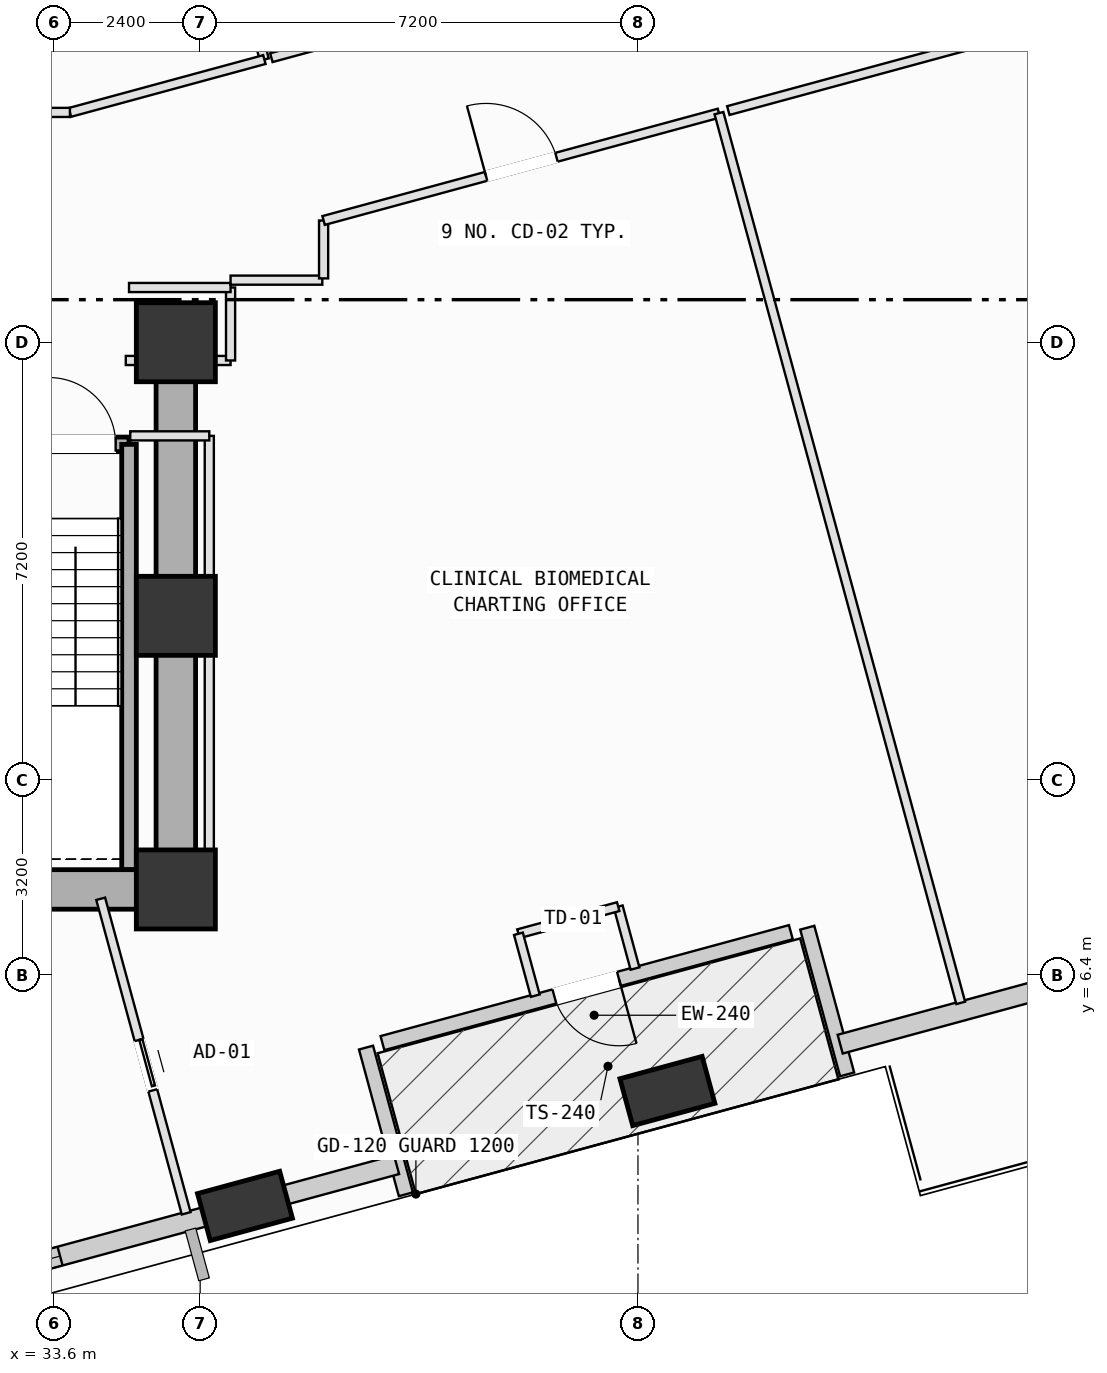
"""IFC4 building model, lengths in metres.
Left out: names, types, materials, properties, quantities, classifications, styles, units other than length and angle.
Written with IfcOpenShell. Run it as: python <this file> out.ifc"""

import sys

from ifc_helpers import new_model, si_unit, direction, frame, frame_2d, origin, origin_2d, place, context, subcontext, project, spatial, rectangle, extrude, element, fill, save


model = new_model("IFC4")
c1 = context("Model", 3, precision=1e-05, world=origin(), true_north=direction((0.0, 1.0)))
c2 = subcontext(c1, "Body", "Model", "MODEL_VIEW")
j1 = project(units=[si_unit("LENGTHUNIT", "METRE"), si_unit("PLANEANGLEUNIT", "RADIAN")], contexts=[c1])
p1 = place(None, origin())
s1 = spatial("IfcSite", under=j1, at=p1, CompositionType="ELEMENT")
p2 = place(p1, origin())
s2 = spatial("IfcBuilding", under=s1, at=p2, CompositionType="ELEMENT")
p3 = place(p2, frame((0.0, 0.0, 88.4)))
s3 = spatial("IfcBuildingStorey", under=s2, at=p3, CompositionType="ELEMENT", Elevation=88.4)
for number, where, z_axis, x_axis in (
    (1, (35.6, 7.8, 0.0), (0.0, 0.0, 1.0), (1.0, 0.0, 0.0)),
    (2, (35.6, 12.3, 0.0), (0.0, 0.0, 1.0), (1.0, 0.0, 0.0)),
    (3, (35.6, 16.8, 0.0), (0.0, 0.0, 1.0), (1.0, 0.0, 0.0)),
):
    element("IfcColumn", number, at=place(p3, frame(where, z_axis=z_axis, x_axis=x_axis)), inside=s3, PredefinedType="COLUMN", context=c2, shape_type="SweptSolid", body=[
        extrude(rectangle(XDim=1.3, YDim=1.3, at=origin_2d()), origin(), (0.0, 0.0, 1.0), 4.0),
    ])
p4 = place(p3, frame((36.737, 2.595, 0.055), z_axis=(0.091494482232, 0.013687179957, 0.995711514861), x_axis=(-0.400965338617, 0.91577205319, 0.024255799796)))
e4 = element("IfcColumn", 4, at=p4, inside=s3, PredefinedType="COLUMN", context=c2, shape_type="SweptSolid", body=[
    extrude(rectangle(XDim=1.4, YDim=0.8, at=origin_2d()), origin(), (0.0, 0.0, 1.0), 3.96),
])
p5 = place(p3, frame((43.685, 4.484, 0.056), z_axis=(0.083481406489, 0.04229560181, 0.995611338243), x_axis=(-0.668997536394, 0.742859501733, 0.024536849522)))
e5 = element("IfcColumn", 5, at=p5, inside=s3, PredefinedType="COLUMN", context=c2, shape_type="SweptSolid", body=[
    extrude(rectangle(XDim=1.4, YDim=0.8, at=origin_2d()), origin(), (0.0, 0.0, 1.0), 3.96),
])
p6 = place(p3, frame((45.714, 7.097, 0.0), z_axis=(0.0, 0.0, 1.0), x_axis=(-0.96502158219, -0.262170452011, 0.0)))
e6 = element("IfcWall", 6, at=p6, inside=s3, PredefinedType="SOLIDWALL", context=c2, shape_type="SweptSolid", body=[
    extrude(rectangle(XDim=6.96, YDim=0.24, at=frame_2d((3.48, 0.0))), origin(), (0.0, 0.0, 1.0), 2.745),
])
p7 = place(p6, frame((2.93, 0.0, 0.0)))
e7 = element("IfcOpeningElement", 7, at=p7, cuts=e6, PredefinedType="OPENING", context=c2, shape_type="SweptSolid", body=[
    extrude(rectangle(XDim=1.1, YDim=2.15, at=frame_2d((0.55, 1.075))), frame((0.0, 0.13, 0.0), z_axis=(0.0, -1.0, 0.0), x_axis=(1.0, 0.0, 0.0)), (0.0, 0.0, 1.0), 0.26),
])
for number, where, z_axis, x_axis in (
    (8, (38.728, 5.199, 0.0), (0.0, 0.0, 1.0), (0.262, -0.965, 0.0)),
    (9, (46.64, 4.758, 0.0), (0.0, 0.0, 1.0), (-0.262, 0.965, 0.0)),
):
    element("IfcWall", number, at=place(p3, frame(where, z_axis=z_axis, x_axis=x_axis)), inside=s3, PredefinedType="SOLIDWALL", context=c2, shape_type="SweptSolid", body=[
        extrude(rectangle(XDim=2.5, YDim=0.24, at=frame_2d((1.25, 0.0))), origin(), (0.0, 0.0, 1.0), 3.165),
    ])
p8 = place(p3, frame((36.431, 2.513, 0.0), z_axis=(0.0, 0.0, 1.0), x_axis=(-0.96501271104, -0.26220310359, 0.0)))
e10 = element("IfcWall", 10, at=p8, inside=s3, PredefinedType="SOLIDWALL", context=c2, shape_type="SweptSolid", body=[
    extrude(rectangle(XDim=6.214, YDim=0.32, at=frame_2d((3.107, 0.0))), origin(), (0.0, 0.0, 1.0), 3.165),
])
p9 = place(p8, frame((2.835, 0.0, 0.75)))
e11 = element("IfcOpeningElement", 11, at=p9, cuts=e10, PredefinedType="OPENING", context=c2, shape_type="SweptSolid", body=[
    extrude(rectangle(XDim=1.4, YDim=1.85, at=frame_2d((0.7, 0.925))), frame((0.0, 0.17, 0.0), z_axis=(0.0, -1.0, 0.0), x_axis=(1.0, 0.0, 0.0)), (0.0, 0.0, 1.0), 0.34),
])
p10 = place(p3, frame((39.23, 3.273, 0.0), z_axis=(0.0, 0.0, 1.0), x_axis=(-0.965005471211, -0.262229747612, 0.0)))
e12 = element("IfcWall", 12, at=p10, inside=s3, PredefinedType="SOLIDWALL", context=c2, shape_type="SweptSolid", body=[
    extrude(rectangle(XDim=1.909, YDim=0.32, at=frame_2d((0.954, 0.0))), origin(), (0.0, 0.0, 1.0), 3.145),
])
p11 = place(p3, frame((50.336, 6.29, 0.0), z_axis=(0.0, 0.0, 1.0), x_axis=(-0.965017376206, -0.262185933302, 0.0)))
e13 = element("IfcWall", 13, at=p11, inside=s3, PredefinedType="SOLIDWALL", context=c2, shape_type="SweptSolid", body=[
    extrude(rectangle(XDim=3.948, YDim=0.32, at=frame_2d((1.974, 0.0))), origin(), (0.0, 0.0, 1.0), 2.745),
])
p12 = place(p3, frame((31.37, 15.12, 0.0), z_axis=(0.0, 0.0, 1.0), x_axis=(1.0, 0.0, 0.0)))
e14 = element("IfcWall", 14, at=p12, inside=s3, PredefinedType="SOLIDWALL", context=c2, shape_type="SweptSolid", body=[
    extrude(rectangle(XDim=3.46, YDim=0.24, at=frame_2d((1.73, 0.0))), origin(), (0.0, 0.0, 1.0), 3.78),
])
p13 = place(p12, frame((2.14, 0.0, 0.0)))
e15 = element("IfcOpeningElement", 15, at=p13, cuts=e14, PredefinedType="OPENING", context=c2, shape_type="SweptSolid", body=[
    extrude(rectangle(XDim=1.1, YDim=2.15, at=frame_2d((0.55, 1.075))), frame((0.0, 0.13, 0.0), z_axis=(0.0, -1.0, 0.0), x_axis=(1.0, 0.0, 0.0)), (0.0, 0.0, 1.0), 0.26),
])
p14 = place(p3, frame((34.83, 15.12, 0.0), z_axis=(0.0, 0.0, 1.0), x_axis=(0.0, -1.0, 0.0)))
e16 = element("IfcWall", 16, at=p14, inside=s3, PredefinedType="SOLIDWALL", context=c2, shape_type="SweptSolid", body=[
    extrude(rectangle(XDim=6.995, YDim=0.24, at=frame_2d((3.498, 0.0))), origin(), (0.0, 0.0, 1.0), 3.78),
])
p15 = place(p3, frame((24.8, 7.8, 0.0), z_axis=(0.0, 0.0, 1.0), x_axis=(1.0, 0.0, 0.0)))
e17 = element("IfcWall", 17, at=p15, inside=s3, PredefinedType="SHEAR", context=c2, shape_type="SweptSolid", body=[
    extrude(rectangle(XDim=10.8, YDim=0.65, at=frame_2d((5.4, 0.0))), origin(), (0.0, 0.0, 1.0), 3.78),
])
p16 = place(p3, frame((35.6, 7.8, 0.0), z_axis=(0.0, 0.0, 1.0), x_axis=(0.0, 1.0, 0.0)))
e18 = element("IfcWall", 18, at=p16, inside=s3, PredefinedType="SHEAR", context=c2, shape_type="SweptSolid", body=[
    extrude(rectangle(XDim=9.0, YDim=0.65, at=frame_2d((4.5, 0.0))), origin(), (0.0, 0.0, 1.0), 3.78),
])
p17 = place(p3, frame((34.364, 7.646, 0.0), z_axis=(0.0, 0.0, 1.0), x_axis=(0.262277228578, -0.96499256752, 0.0)))
e19 = element("IfcWall", 19, at=p17, inside=s3, PredefinedType="PARTITIONING", context=c2, shape_type="SweptSolid", body=[
    extrude(rectangle(XDim=5.361, YDim=0.15, at=frame_2d((2.68, 0.0))), origin(), (0.0, 0.0, 1.0), 3.78),
])
p18 = place(p17, frame((2.406, 0.0, 0.0)))
e20 = element("IfcOpeningElement", 20, at=p18, cuts=e19, PredefinedType="OPENING", context=c2, shape_type="SweptSolid", body=[
    extrude(rectangle(XDim=0.86, YDim=2.06, at=frame_2d((0.43, 1.03))), frame((0.0, 0.085, 0.0), z_axis=(0.0, -1.0, 0.0), x_axis=(1.0, 0.0, 0.0)), (0.0, 0.0, 1.0), 0.17),
])
p19 = place(p3, frame((37.449, 2.551, 0.0), z_axis=(0.0, 0.0, 1.0), x_axis=(-0.965019012576, -0.262179910304, 0.0)))
e21 = element("IfcWall", 21, at=p19, inside=s3, PredefinedType="PARTITIONING", context=c2, shape_type="SweptSolid", body=[
    extrude(rectangle(XDim=0.992, YDim=0.15, at=frame_2d((0.496, 0.0))), origin(), (0.0, 0.0, 1.0), 3.145),
])
p20 = place(p3, frame((35.6, 7.5, 0.0), z_axis=(0.0, 0.0, 1.0), x_axis=(1.0, 0.0, 0.0)))
e22 = element("IfcWall", 22, at=p20, inside=s3, PredefinedType="PARTITIONING", context=c2, shape_type="SweptSolid", body=[
    extrude(rectangle(XDim=0.55, YDim=0.15, at=frame_2d((0.275, 0.0))), origin(), (0.0, 0.0, 1.0), 2.745),
])
p21 = place(p3, frame((36.15, 7.5, 0.0), z_axis=(0.0, 0.0, 1.0), x_axis=(0.0, 1.0, 0.0)))
e23 = element("IfcWall", 23, at=p21, inside=s3, PredefinedType="PARTITIONING", context=c2, shape_type="SweptSolid", body=[
    extrude(rectangle(XDim=7.76, YDim=0.15, at=frame_2d((3.88, 0.0))), origin(), (0.0, 0.0, 1.0), 2.765),
])
p22 = place(p3, frame((36.15, 15.26, 0.0), z_axis=(0.0, 0.0, 1.0), x_axis=(-1.0, 0.0, 0.0)))
e24 = element("IfcWall", 24, at=p22, inside=s3, PredefinedType="PARTITIONING", context=c2, shape_type="SweptSolid", body=[
    extrude(rectangle(XDim=1.3, YDim=0.15, at=frame_2d((0.65, 0.0))), origin(), (0.0, 0.0, 1.0), 3.78),
])
p23 = place(p3, frame((34.777, 16.5, 0.0), z_axis=(0.0, 0.0, 1.0), x_axis=(1.0, 0.0, 0.0)))
e25 = element("IfcWall", 25, at=p23, inside=s3, PredefinedType="PARTITIONING", context=c2, shape_type="SweptSolid", body=[
    extrude(rectangle(XDim=1.723, YDim=0.15, at=frame_2d((0.861, 0.0))), origin(), (0.0, 0.0, 1.0), 2.765),
])
p24 = place(p3, frame((36.5, 16.5, 0.0), z_axis=(0.0, 0.0, 1.0), x_axis=(0.0, 1.0, 0.0)))
e26 = element("IfcWall", 26, at=p24, inside=s3, PredefinedType="PARTITIONING", context=c2, shape_type="SweptSolid", body=[
    extrude(rectangle(XDim=1.2, YDim=0.15, at=frame_2d((0.6, 0.0))), origin(), (0.0, 0.0, 1.0), 3.78),
])
p25 = place(p3, frame((36.5, 17.7, 0.0), z_axis=(0.0, 0.0, 1.0), x_axis=(-1.0, 0.0, 0.0)))
e27 = element("IfcWall", 27, at=p25, inside=s3, PredefinedType="PARTITIONING", context=c2, shape_type="SweptSolid", body=[
    extrude(rectangle(XDim=1.67, YDim=0.15, at=frame_2d((0.835, 0.0))), origin(), (0.0, 0.0, 1.0), 3.78),
])
p26 = place(p3, frame((36.5, 17.821, 0.0), z_axis=(0.0, 0.0, 1.0), x_axis=(1.0, 0.0, 0.0)))
e28 = element("IfcWall", 28, at=p26, inside=s3, PredefinedType="PARTITIONING", context=c2, shape_type="SweptSolid", body=[
    extrude(rectangle(XDim=1.509, YDim=0.15, at=frame_2d((0.754, 0.0))), origin(), (0.0, 0.0, 1.0), 3.78),
])
p27 = place(p3, frame((38.03, 17.85, 0.0), z_axis=(0.0, 0.0, 1.0), x_axis=(0.0, 1.0, 0.0)))
e29 = element("IfcWall", 29, at=p27, inside=s3, PredefinedType="PARTITIONING", context=c2, shape_type="SweptSolid", body=[
    extrude(rectangle(XDim=0.952, YDim=0.15, at=frame_2d((0.476, 0.0))), origin(), (0.0, 0.0, 1.0), 3.78),
])
p28 = place(p3, frame((38.03, 18.802, 0.0), z_axis=(0.0, 0.0, 1.0), x_axis=(0.965032576147, 0.26212998107, 0.0)))
e30 = element("IfcWall", 30, at=p28, inside=s3, PredefinedType="PARTITIONING", context=c2, shape_type="SweptSolid", body=[
    extrude(rectangle(XDim=6.738, YDim=0.15, at=frame_2d((3.369, 0.0))), origin(), (0.0, 0.0, 1.0), 2.765),
])
p29 = place(p28, frame((2.769, 0.0, 0.0)))
e31 = element("IfcOpeningElement", 31, at=p29, cuts=e30, PredefinedType="OPENING", context=c2, shape_type="SweptSolid", body=[
    extrude(rectangle(XDim=1.2, YDim=2.15, at=frame_2d((0.6, 1.075))), frame((0.0, 0.085, 0.0), z_axis=(0.0, -1.0, 0.0), x_axis=(1.0, 0.0, 0.0)), (0.0, 0.0, 1.0), 0.17),
])
p30 = place(p3, frame((44.532, 20.568, 0.0), z_axis=(0.0, 0.0, 1.0), x_axis=(0.262195036903, -0.965014902799, 0.0)))
e32 = element("IfcWall", 32, at=p30, inside=s3, PredefinedType="PARTITIONING", context=c2, shape_type="SweptSolid", body=[
    extrude(rectangle(XDim=15.165, YDim=0.15, at=frame_2d((7.582, 0.0))), origin(), (0.0, 0.0, 1.0), 3.78),
])
p31 = place(p3, frame((43.151, 6.499, 0.0), z_axis=(0.0, 0.0, 1.0), x_axis=(-0.261550249958, 0.965189860466, 0.0)))
e33 = element("IfcWall", 33, at=p31, inside=s3, PredefinedType="PARTITIONING", context=c2, shape_type="SweptSolid", body=[
    extrude(rectangle(XDim=1.055, YDim=0.15, at=frame_2d((0.527, 0.0))), origin(), (0.0, 0.0, 1.0), 3.78),
])
p32 = place(p3, frame((42.875, 7.517, 0.0), z_axis=(0.0, 0.0, 1.0), x_axis=(-0.964992044521, -0.262279152833, 0.0)))
e34 = element("IfcWall", 34, at=p32, inside=s3, PredefinedType="PARTITIONING", context=c2, shape_type="SweptSolid", body=[
    extrude(rectangle(XDim=1.701, YDim=0.15, at=frame_2d((0.85, 0.0))), origin(), (0.0, 0.0, 1.0), 2.745),
])
p33 = place(p3, frame((41.234, 7.071, 0.0), z_axis=(0.0, 0.0, 1.0), x_axis=(0.262627892629, -0.964897191422, 0.0)))
e35 = element("IfcWall", 35, at=p33, inside=s3, PredefinedType="PARTITIONING", context=c2, shape_type="SweptSolid", body=[
    extrude(rectangle(XDim=1.055, YDim=0.15, at=frame_2d((0.528, 0.0))), origin(), (0.0, 0.0, 1.0), 3.78),
])
p34 = place(p3, frame((44.686, 20.61, 0.0), z_axis=(0.0, 0.0, 1.0), x_axis=(0.965015946981, 0.262191193736, 0.0)))
e36 = element("IfcWall", 36, at=p34, inside=s3, PredefinedType="PARTITIONING", context=c2, shape_type="SweptSolid", body=[
    extrude(rectangle(XDim=10.64, YDim=0.15, at=frame_2d((5.32, 0.0))), origin(), (0.0, 0.0, 1.0), 3.78),
])
p35 = place(p34, frame((4.72, 0.0, 0.0)))
e37 = element("IfcOpeningElement", 37, at=p35, cuts=e36, PredefinedType="OPENING", context=c2, shape_type="SweptSolid", body=[
    extrude(rectangle(XDim=1.2, YDim=2.15, at=frame_2d((0.6, 1.075))), frame((0.0, 0.085, 0.0), z_axis=(0.0, -1.0, 0.0), x_axis=(1.0, 0.0, 0.0)), (0.0, 0.0, 1.0), 0.17),
])
p36 = place(p3, frame((36.36, 24.011, 0.0), z_axis=(0.0, 0.0, 1.0), x_axis=(0.262090118072, -0.965043403174, 0.0)))
e38 = element("IfcWall", 38, at=p36, inside=s3, PredefinedType="PARTITIONING", context=c2, shape_type="SweptSolid", body=[
    extrude(rectangle(XDim=2.655, YDim=0.15, at=frame_2d((1.327, 0.0))), origin(), (0.0, 0.0, 1.0), 3.78),
])
p37 = place(p3, frame((37.056, 21.449, 0.0), z_axis=(0.0, 0.0, 1.0), x_axis=(-0.965014994537, -0.262194699256, 0.0)))
e39 = element("IfcWall", 39, at=p37, inside=s3, PredefinedType="PARTITIONING", context=c2, shape_type="SweptSolid", body=[
    extrude(rectangle(XDim=3.314, YDim=0.15, at=frame_2d((1.657, 0.0))), origin(), (0.0, 0.0, 1.0), 3.78),
])
p38 = place(p3, frame((33.858, 20.58, 0.0), z_axis=(0.0, 0.0, 1.0), x_axis=(-1.0, 0.0, 0.0)))
e40 = element("IfcWall", 40, at=p38, inside=s3, PredefinedType="PARTITIONING", context=c2, shape_type="SweptSolid", body=[
    extrude(rectangle(XDim=13.039, YDim=0.15, at=frame_2d((6.52, 0.0))), origin(), (0.0, 0.0, 1.0), 3.78),
])
p39 = place(p38, frame((7.273, 0.0, 0.0)))
e41 = element("IfcOpeningElement", 41, at=p39, cuts=e40, PredefinedType="OPENING", context=c2, shape_type="SweptSolid", body=[
    extrude(rectangle(XDim=1.2, YDim=2.15, at=frame_2d((0.6, 1.075))), frame((0.0, 0.085, 0.0), z_axis=(0.0, -1.0, 0.0), x_axis=(1.0, 0.0, 0.0)), (0.0, 0.0, 1.0), 0.17),
])
p40 = place(p3, frame((48.999, 24.694, 0.0), z_axis=(0.0, 0.0, 1.0), x_axis=(-0.965006566945, -0.262225715279, 0.0)))
e42 = element("IfcWall", 42, at=p40, inside=s3, PredefinedType="PARTITIONING", context=c2, shape_type="SweptSolid", body=[
    extrude(rectangle(XDim=12.257, YDim=0.15, at=frame_2d((6.128, 0.0))), origin(), (0.0, 0.0, 1.0), 2.765),
])
p41 = place(p40, frame((5.528, 0.0, 0.0)))
e43 = element("IfcOpeningElement", 43, at=p41, cuts=e42, PredefinedType="OPENING", context=c2, shape_type="SweptSolid", body=[
    extrude(rectangle(XDim=1.2, YDim=2.15, at=frame_2d((0.6, 1.075))), frame((0.0, 0.085, 0.0), z_axis=(0.0, -1.0, 0.0), x_axis=(1.0, 0.0, 0.0)), (0.0, 0.0, 1.0), 0.17),
])
p42 = place(p7, origin())
e44 = element("IfcDoor", 44, at=p42, inside=s3, OperationType="SINGLE_SWING_LEFT", PredefinedType="DOOR", context=c2, shape_type="SweptSolid", body=[
    extrude(rectangle(XDim=1.1, YDim=2.15, at=frame_2d((0.55, 1.075))), frame((0.0, 0.025, 0.0), z_axis=(0.0, -1.0, 0.0), x_axis=(1.0, 0.0, 0.0)), (0.0, 0.0, 1.0), 0.05),
])
fill(e7, e44)
p43 = place(p9, origin())
e45 = element("IfcWindow", 45, at=p43, inside=s3, PartitioningType="SINGLE_PANEL", PredefinedType="WINDOW", context=c2, shape_type="SweptSolid", body=[
    extrude(rectangle(XDim=1.4, YDim=1.85, at=frame_2d((0.7, 0.925))), frame((0.0, 0.03, 0.0), z_axis=(0.0, -1.0, 0.0), x_axis=(1.0, 0.0, 0.0)), (0.0, 0.0, 1.0), 0.06),
])
fill(e11, e45)
p44 = place(p13, origin())
e46 = element("IfcDoor", 46, at=p44, inside=s3, OperationType="SINGLE_SWING_LEFT", PredefinedType="DOOR", context=c2, shape_type="SweptSolid", body=[
    extrude(rectangle(XDim=1.1, YDim=2.15, at=frame_2d((0.55, 1.075))), frame((0.0, 0.025, 0.0), z_axis=(0.0, -1.0, 0.0), x_axis=(1.0, 0.0, 0.0)), (0.0, 0.0, 1.0), 0.05),
])
fill(e15, e46)
p45 = place(p29, origin())
e47 = element("IfcDoor", 47, at=p45, inside=s3, OperationType="SINGLE_SWING_LEFT", PredefinedType="DOOR", context=c2, shape_type="SweptSolid", body=[
    extrude(rectangle(XDim=1.2, YDim=2.15, at=frame_2d((0.6, 1.075))), frame((0.0, 0.025, 0.0), z_axis=(0.0, -1.0, 0.0), x_axis=(1.0, 0.0, 0.0)), (0.0, 0.0, 1.0), 0.05),
])
fill(e31, e47)
p46 = place(p18, origin())
e48 = element("IfcDoor", 48, at=p46, inside=s3, OperationType="SLIDING_TO_LEFT", PredefinedType="DOOR", context=c2, shape_type="SweptSolid", body=[
    extrude(rectangle(XDim=0.86, YDim=2.06, at=frame_2d((0.43, 1.03))), frame((0.0, 0.025, 0.0), z_axis=(0.0, -1.0, 0.0), x_axis=(1.0, 0.0, 0.0)), (0.0, 0.0, 1.0), 0.05),
])
fill(e20, e48)
save(model, sys.argv[1])
